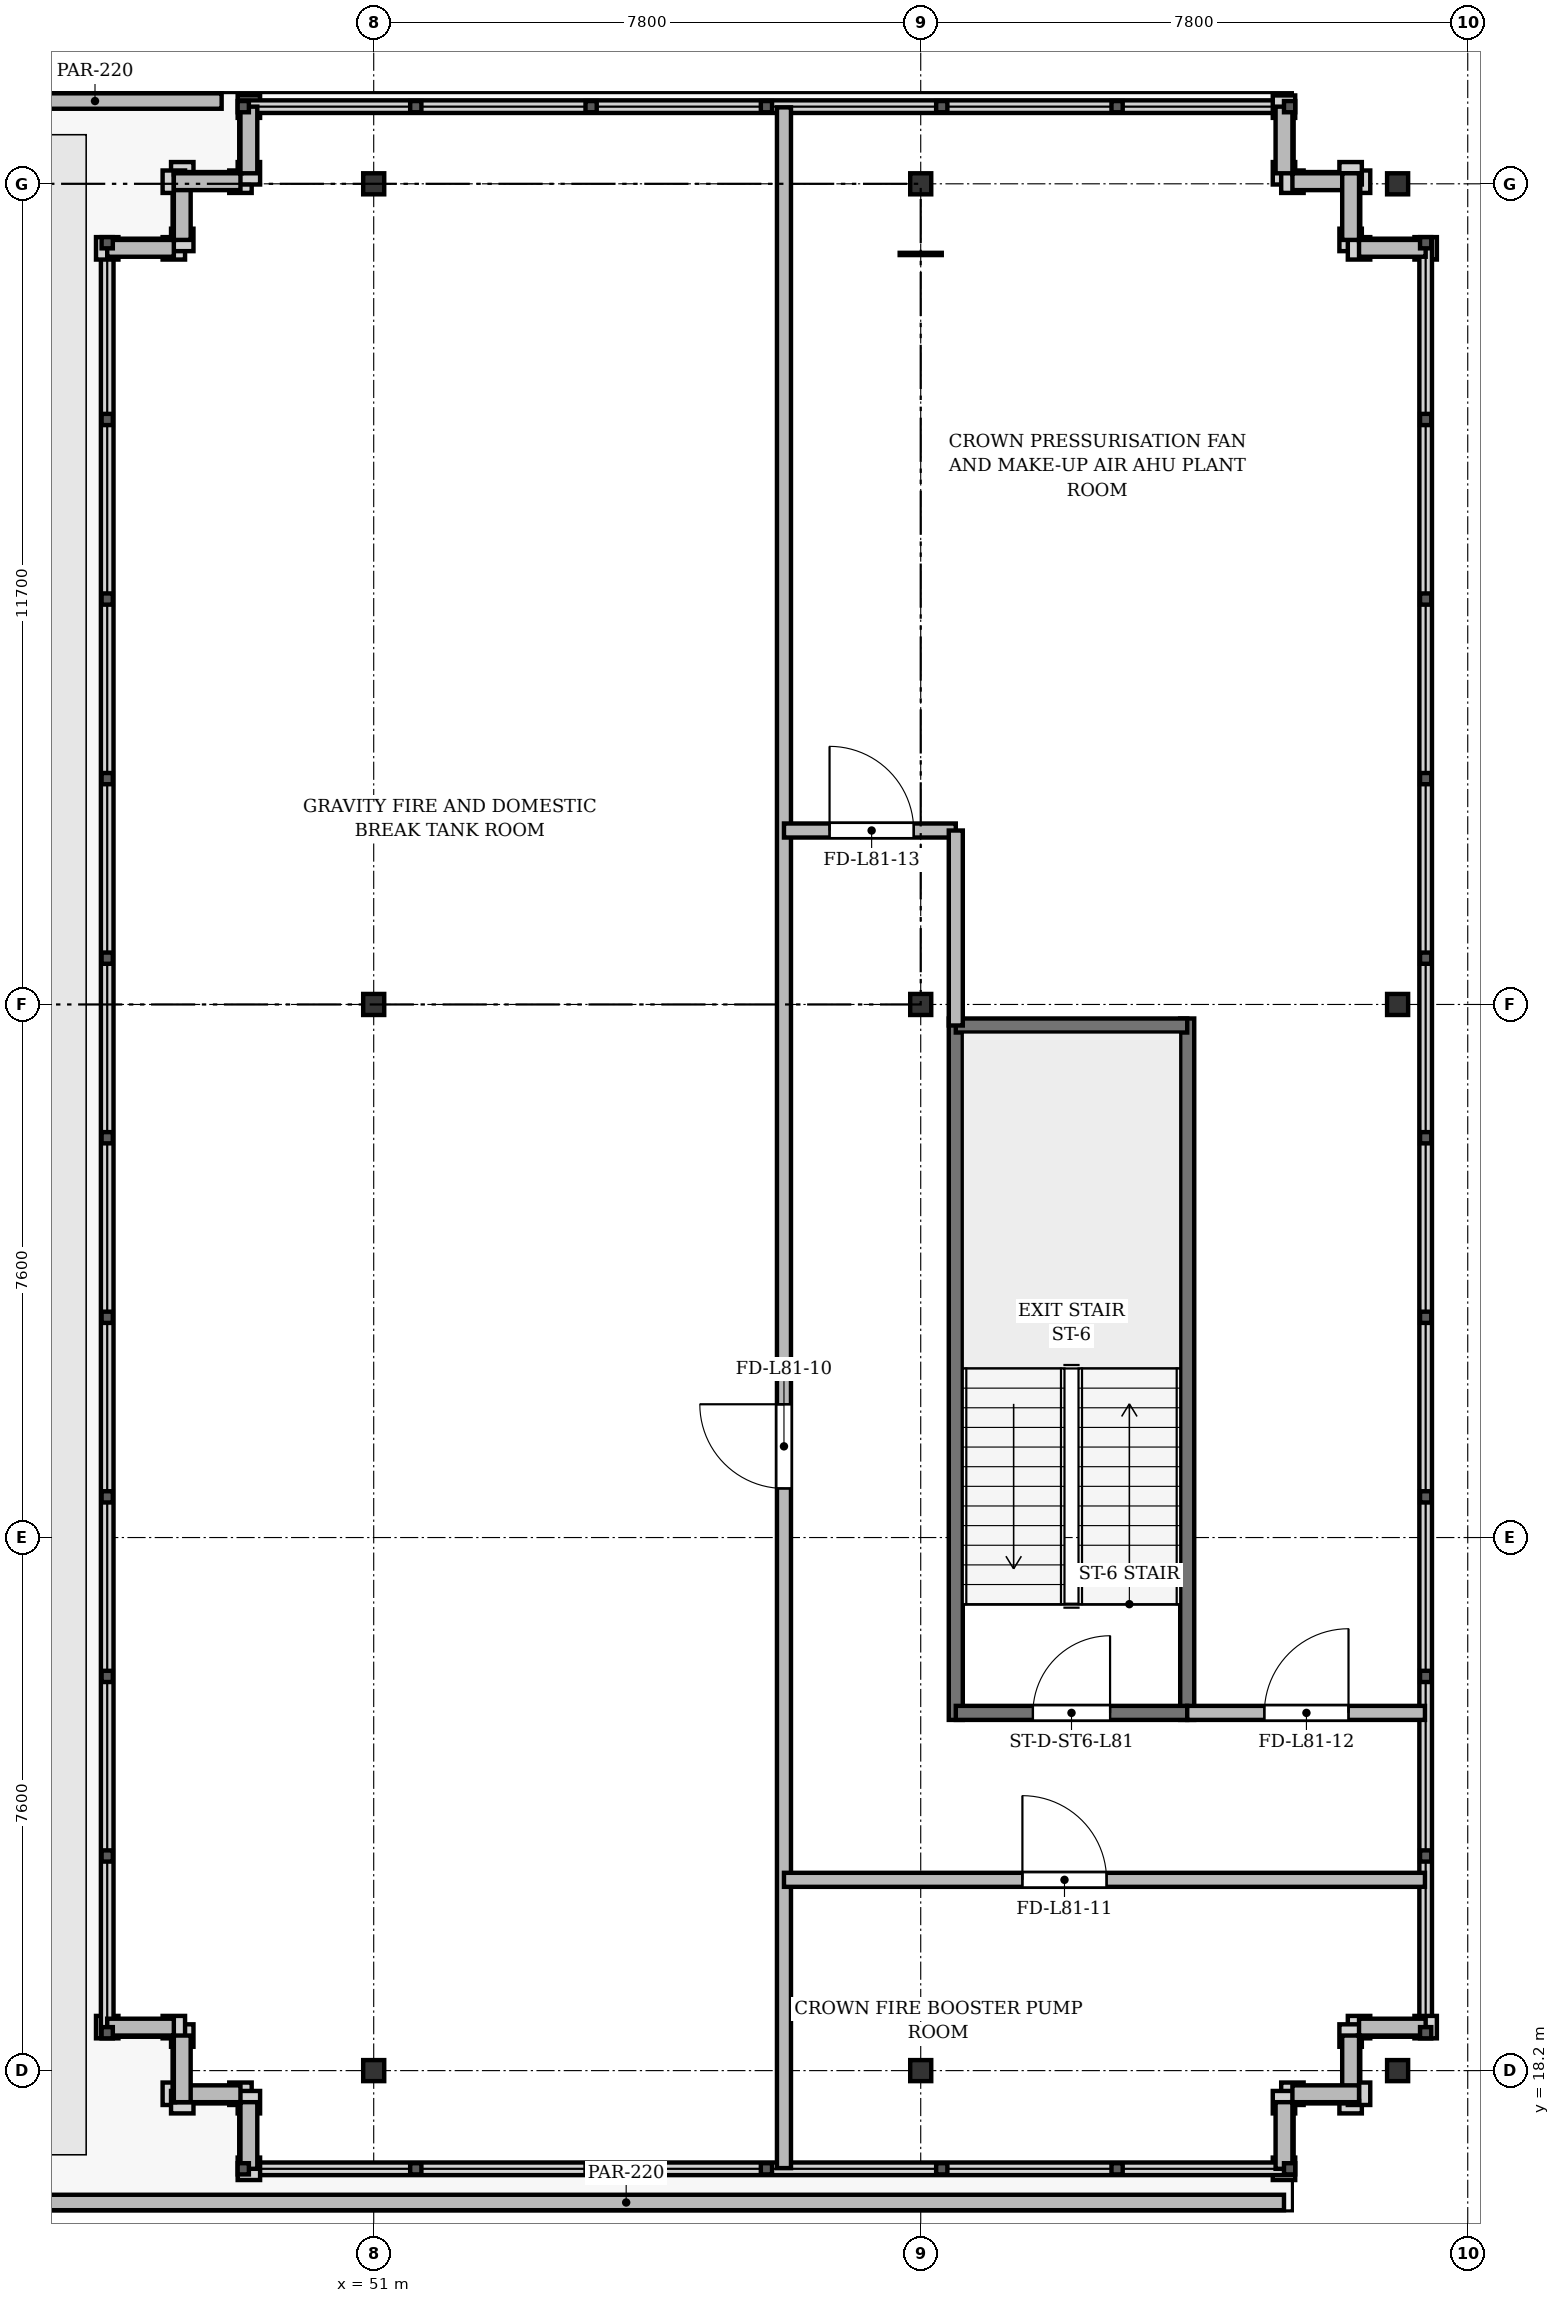
"""IFC4 building model, lengths in metres.
Left out: names, types, materials, properties, quantities, classifications, styles, units other than length and angle.
Written with IfcOpenShell. Run it as: python <this file> out.ifc"""

import sys

from ifc_helpers import new_model, si_unit, direction, frame, frame_2d, origin, origin_2d, place, context, subcontext, project, spatial, rectangle, i_section, extrude, source, transform, mapped, element, fill, save


model = new_model("IFC4")
c1 = context("Model", 3, precision=1e-05, world=origin(), true_north=direction((0.0, 1.0)))
c2 = subcontext(c1, "Body", "Model", "MODEL_VIEW")
j1 = project(units=[si_unit("LENGTHUNIT", "METRE"), si_unit("PLANEANGLEUNIT", "RADIAN")], contexts=[c1])
p1 = place(None, origin())
s1 = spatial("IfcSite", under=j1, at=p1, CompositionType="ELEMENT")
p2 = place(p1, origin())
s2 = spatial("IfcBuilding", under=s1, at=p2, CompositionType="ELEMENT")
p3 = place(p2, frame((0.0, 0.0, 312.3)))
s3 = spatial("IfcBuildingStorey", under=s2, at=p3, CompositionType="ELEMENT", Elevation=312.3)
m1 = source(origin(), c2, "Body", "SweptSolid", [
    extrude(i_section(OverallWidth=0.3, OverallDepth=0.3, WebThickness=0.015, FlangeThickness=0.024, at=origin_2d()), origin(), (0.0, 0.0, 1.0), 4.4),
])
for number, where, z_axis, x_axis in (
    (1, (51.0, 18.2, 0.0), (0.0, 0.0, 1.0), (1.0, 0.0, 0.0)),
    (2, (51.0, 33.4, 0.0), (0.0, 0.0, 1.0), (1.0, 0.0, 0.0)),
    (3, (51.0, 45.1, 0.0), (0.0, 0.0, 1.0), (1.0, 0.0, 0.0)),
    (4, (58.8, 18.2, 0.0), (0.0, 0.0, 1.0), (1.0, 0.0, 0.0)),
    (5, (58.8, 33.4, 0.0), (0.0, 0.0, 1.0), (1.0, 0.0, 0.0)),
    (6, (58.8, 45.1, 0.0), (0.0, 0.0, 1.0), (1.0, 0.0, 0.0)),
    (7, (65.6, 18.2, 0.0), (0.0, 0.0, 1.0), (1.0, 0.0, 0.0)),
    (8, (65.6, 33.4, 0.0), (0.0, 0.0, 1.0), (1.0, 0.0, 0.0)),
    (9, (65.6, 45.1, 0.0), (0.0, 0.0, 1.0), (1.0, 0.0, 0.0)),
):
    element("IfcColumn", number, at=place(p3, frame(where, z_axis=z_axis, x_axis=x_axis)), inside=s3, PredefinedType="COLUMN", context=c2, shape_type="MappedRepresentation", body=[
        mapped(m1, transform((0.0, 0.0, 0.0), x_axis=(1.0, 0.0, 0.0), y_axis=(0.0, 1.0, 0.0), z_axis=(0.0, 0.0, 1.0), scale=1.0)),
    ])
p4 = place(p3, frame((49.1, 17.87, 0.0), z_axis=(0.0, 0.0, 1.0), x_axis=(-1.0, 0.0, 0.0)))
e10 = element("IfcWall", 10, at=p4, inside=s3, PredefinedType="SOLIDWALL", context=c2, shape_type="SweptSolid", body=[
    extrude(rectangle(XDim=0.95, YDim=0.24, at=frame_2d((0.475, 0.0))), origin(), (0.0, 0.0, 1.0), 4.11),
])
for number, where, z_axis, x_axis in (
    (11, (48.27, 17.75, 0.0), (0.0, 0.0, 1.0), (0.0, 1.0, 0.0)),
    (12, (48.15, 18.82, 0.0), (0.0, 0.0, 1.0), (-1.0, 0.0, 0.0)),
    (13, (47.2, 44.18, 0.0), (0.0, 0.0, 1.0), (1.0, 0.0, 0.0)),
    (14, (48.27, 44.3, 0.0), (0.0, 0.0, 1.0), (0.0, 1.0, 0.0)),
):
    element("IfcWall", number, at=place(p3, frame(where, z_axis=z_axis, x_axis=x_axis)), inside=s3, PredefinedType="SOLIDWALL", context=c2, shape_type="SweptSolid", body=[
        extrude(rectangle(XDim=0.95, YDim=0.24, at=frame_2d((0.475, 0.0))), origin(), (0.0, 0.0, 1.0), 4.11),
    ])
p5 = place(p3, frame((48.15, 45.13, 0.0), z_axis=(0.0, 0.0, 1.0), x_axis=(1.0, 0.0, 0.0)))
e15 = element("IfcWall", 15, at=p5, inside=s3, PredefinedType="SOLIDWALL", context=c2, shape_type="SweptSolid", body=[
    extrude(rectangle(XDim=0.95, YDim=0.24, at=frame_2d((0.475, 0.0))), origin(), (0.0, 0.0, 1.0), 4.11),
])
for number, where, z_axis, x_axis in (
    (16, (49.22, 45.25, 0.0), (0.0, 0.0, 1.0), (0.0, 1.0, 0.0)),
    (17, (63.98, 46.2, 0.0), (0.0, 0.0, 1.0), (0.0, -1.0, 0.0)),
):
    element("IfcWall", number, at=place(p3, frame(where, z_axis=z_axis, x_axis=x_axis)), inside=s3, PredefinedType="SOLIDWALL", context=c2, shape_type="SweptSolid", body=[
        extrude(rectangle(XDim=0.95, YDim=0.24, at=frame_2d((0.475, 0.0))), origin(), (0.0, 0.0, 1.0), 4.11),
    ])
for number, where, z_axis, x_axis in (
    (18, (64.1, 45.13, 0.0), (0.0, 0.0, 1.0), (1.0, 0.0, 0.0)),
    (19, (64.93, 45.25, 0.0), (0.0, 0.0, 1.0), (0.0, -1.0, 0.0)),
    (20, (65.05, 44.18, 0.0), (0.0, 0.0, 1.0), (1.0, 0.0, 0.0)),
    (21, (66.0, 18.82, 0.0), (0.0, 0.0, 1.0), (-1.0, 0.0, 0.0)),
    (22, (64.93, 18.7, 0.0), (0.0, 0.0, 1.0), (0.0, -1.0, 0.0)),
):
    element("IfcWall", number, at=place(p3, frame(where, z_axis=z_axis, x_axis=x_axis)), inside=s3, PredefinedType="SOLIDWALL", context=c2, shape_type="SweptSolid", body=[
        extrude(rectangle(XDim=0.95, YDim=0.24, at=frame_2d((0.475, 0.0))), origin(), (0.0, 0.0, 1.0), 3.61),
    ])
for number, where, z_axis, x_axis in (
    (23, (65.05, 17.87, 0.0), (0.0, 0.0, 1.0), (-1.0, 0.0, 0.0)),
    (24, (63.98, 17.75, 0.0), (0.0, 0.0, 1.0), (0.0, -1.0, 0.0)),
    (25, (49.22, 16.8, 0.0), (0.0, 0.0, 1.0), (0.0, 1.0, 0.0)),
):
    element("IfcWall", number, at=place(p3, frame(where, z_axis=z_axis, x_axis=x_axis)), inside=s3, PredefinedType="SOLIDWALL", context=c2, shape_type="SweptSolid", body=[
        extrude(rectangle(XDim=0.95, YDim=0.24, at=frame_2d((0.475, 0.0))), origin(), (0.0, 0.0, 1.0), 4.11),
    ])
p6 = place(p3, frame((45.22, 46.28, 0.0), z_axis=(0.0, 0.0, 1.0), x_axis=(1.0, 0.0, 0.0)))
e26 = element("IfcWall", 26, at=p6, inside=s3, PredefinedType="PARAPET", context=c2, shape_type="SweptSolid", body=[
    extrude(rectangle(XDim=3.612, YDim=0.22, at=frame_2d((1.806, 0.0))), origin(), (0.0, 0.0, 1.0), 1.08),
])
p7 = place(p3, frame((63.98, 16.32, 0.0), z_axis=(0.0, 0.0, 1.0), x_axis=(-1.0, 0.0, 0.0)))
e27 = element("IfcWall", 27, at=p7, inside=s3, PredefinedType="PARAPET", context=c2, shape_type="SweptSolid", body=[
    extrude(rectangle(XDim=18.76, YDim=0.22, at=frame_2d((9.38, 0.0))), origin(), (0.0, 0.0, 1.0), 1.08),
])
for number, where, z_axis, x_axis in (
    (28, (59.3, 23.2, 0.0), (0.0, 0.0, 1.0), (0.0, 1.0, 0.0)),
    (29, (62.6, 23.2, 0.0), (0.0, 0.0, 1.0), (0.0, 1.0, 0.0)),
):
    element("IfcWall", number, at=place(p3, frame(where, z_axis=z_axis, x_axis=x_axis)), inside=s3, PredefinedType="SHEAR", context=c2, shape_type="SweptSolid", body=[
        extrude(rectangle(XDim=10.0, YDim=0.2, at=frame_2d((5.0, 0.0))), origin(), (0.0, 0.0, 1.0), 4.11),
    ])
p8 = place(p3, frame((59.3, 33.1, 0.0), z_axis=(0.0, 0.0, 1.0), x_axis=(1.0, 0.0, 0.0)))
e30 = element("IfcWall", 30, at=p8, inside=s3, PredefinedType="SHEAR", context=c2, shape_type="SweptSolid", body=[
    extrude(rectangle(XDim=3.3, YDim=0.2, at=frame_2d((1.65, 0.0))), origin(), (0.0, 0.0, 1.0), 4.11),
])
p9 = place(p3, frame((59.3, 23.3, 0.0), z_axis=(0.0, 0.0, 1.0), x_axis=(1.0, 0.0, 0.0)))
e31 = element("IfcWall", 31, at=p9, inside=s3, PredefinedType="SHEAR", context=c2, shape_type="SweptSolid", body=[
    extrude(rectangle(XDim=3.3, YDim=0.2, at=frame_2d((1.65, 0.0))), origin(), (0.0, 0.0, 1.0), 4.11),
])
p10 = place(p9, frame((1.1, 0.0, 0.0)))
e32 = element("IfcOpeningElement", 32, at=p10, cuts=e31, PredefinedType="OPENING", context=c2, shape_type="SweptSolid", body=[
    extrude(rectangle(XDim=1.1, YDim=2.15, at=frame_2d((0.55, 1.075))), frame((0.0, 0.11, 0.0), z_axis=(0.0, -1.0, 0.0), x_axis=(1.0, 0.0, 0.0)), (0.0, 0.0, 1.0), 0.22),
])
p11 = place(p3, frame((56.85, 16.81, 0.0), z_axis=(0.0, 0.0, 1.0), x_axis=(0.0, 1.0, 0.0)))
e33 = element("IfcWall", 33, at=p11, inside=s3, PredefinedType="PARTITIONING", context=c2, shape_type="SweptSolid", body=[
    extrude(rectangle(XDim=29.38, YDim=0.2, at=frame_2d((14.69, 0.0))), origin(), (0.0, 0.0, 1.0), 3.61),
])
p12 = place(p11, frame((9.69, 0.0, 0.0)))
e34 = element("IfcOpeningElement", 34, at=p12, cuts=e33, PredefinedType="OPENING", context=c2, shape_type="SweptSolid", body=[
    extrude(rectangle(XDim=1.2, YDim=2.15, at=frame_2d((0.6, 1.075))), frame((0.0, 0.11, 0.0), z_axis=(0.0, -1.0, 0.0), x_axis=(1.0, 0.0, 0.0)), (0.0, 0.0, 1.0), 0.22),
])
p13 = place(p3, frame((56.85, 20.92, 0.0), z_axis=(0.0, 0.0, 1.0), x_axis=(1.0, 0.0, 0.0)))
e35 = element("IfcWall", 35, at=p13, inside=s3, PredefinedType="PARTITIONING", context=c2, shape_type="SweptSolid", body=[
    extrude(rectangle(XDim=9.14, YDim=0.2, at=frame_2d((4.57, 0.0))), origin(), (0.0, 0.0, 1.0), 3.61),
])
p14 = place(p13, frame((3.4, 0.0, 0.0)))
e36 = element("IfcOpeningElement", 36, at=p14, cuts=e35, PredefinedType="OPENING", context=c2, shape_type="SweptSolid", body=[
    extrude(rectangle(XDim=1.2, YDim=2.15, at=frame_2d((0.6, 1.075))), frame((0.0, 0.11, 0.0), z_axis=(0.0, -1.0, 0.0), x_axis=(1.0, 0.0, 0.0)), (0.0, 0.0, 1.0), 0.22),
])
p15 = place(p3, frame((62.6, 23.3, 0.0), z_axis=(0.0, 0.0, 1.0), x_axis=(1.0, 0.0, 0.0)))
e37 = element("IfcWall", 37, at=p15, inside=s3, PredefinedType="PARTITIONING", context=c2, shape_type="SweptSolid", body=[
    extrude(rectangle(XDim=3.39, YDim=0.2, at=frame_2d((1.695, 0.0))), origin(), (0.0, 0.0, 1.0), 3.61),
])
p16 = place(p15, frame((1.1, 0.0, 0.0)))
e38 = element("IfcOpeningElement", 38, at=p16, cuts=e37, PredefinedType="OPENING", context=c2, shape_type="SweptSolid", body=[
    extrude(rectangle(XDim=1.2, YDim=2.15, at=frame_2d((0.6, 1.075))), frame((0.0, 0.11, 0.0), z_axis=(0.0, -1.0, 0.0), x_axis=(1.0, 0.0, 0.0)), (0.0, 0.0, 1.0), 0.22),
])
p17 = place(p3, frame((56.85, 35.88, 0.0), z_axis=(0.0, 0.0, 1.0), x_axis=(1.0, 0.0, 0.0)))
e39 = element("IfcWall", 39, at=p17, inside=s3, PredefinedType="PARTITIONING", context=c2, shape_type="SweptSolid", body=[
    extrude(rectangle(XDim=2.45, YDim=0.2, at=frame_2d((1.225, 0.0))), origin(), (0.0, 0.0, 1.0), 3.61),
])
p18 = place(p17, frame((0.65, 0.0, 0.0)))
e40 = element("IfcOpeningElement", 40, at=p18, cuts=e39, PredefinedType="OPENING", context=c2, shape_type="SweptSolid", body=[
    extrude(rectangle(XDim=1.2, YDim=2.15, at=frame_2d((0.6, 1.075))), frame((0.0, 0.11, 0.0), z_axis=(0.0, -1.0, 0.0), x_axis=(1.0, 0.0, 0.0)), (0.0, 0.0, 1.0), 0.22),
])
p19 = place(p3, frame((59.3, 33.1, 0.0), z_axis=(0.0, 0.0, 1.0), x_axis=(0.0, 1.0, 0.0)))
e41 = element("IfcWall", 41, at=p19, inside=s3, PredefinedType="PARTITIONING", context=c2, shape_type="SweptSolid", body=[
    extrude(rectangle(XDim=2.78, YDim=0.2, at=frame_2d((1.39, 0.0))), origin(), (0.0, 0.0, 1.0), 3.61),
])
m2 = source(origin(), c2, "Body", "SweptSolid", [
    extrude(rectangle(XDim=1.1, YDim=2.15, at=frame_2d((0.55, 1.075))), frame((0.0, 0.025, 0.0), z_axis=(0.0, -1.0, 0.0), x_axis=(1.0, 0.0, 0.0)), (0.0, 0.0, 1.0), 0.05),
])
p20 = place(p10, origin())
e42 = element("IfcDoor", 42, at=p20, inside=s3, OperationType="SINGLE_SWING_RIGHT", PredefinedType="DOOR", context=c2, shape_type="MappedRepresentation", body=[
    mapped(m2, transform((0.0, 0.0, 0.0), x_axis=(1.0, 0.0, 0.0), y_axis=(0.0, 1.0, 0.0), z_axis=(0.0, 0.0, 1.0), scale=1.0)),
])
fill(e32, e42)
m3 = source(origin(), c2, "Body", "SweptSolid", [
    extrude(rectangle(XDim=1.2, YDim=2.15, at=frame_2d((0.6, 1.075))), frame((0.0, 0.025, 0.0), z_axis=(0.0, -1.0, 0.0), x_axis=(1.0, 0.0, 0.0)), (0.0, 0.0, 1.0), 0.05),
])
p21 = place(p12, origin())
e43 = element("IfcDoor", 43, at=p21, inside=s3, OperationType="SINGLE_SWING_RIGHT", PredefinedType="DOOR", context=c2, shape_type="MappedRepresentation", body=[
    mapped(m3, transform((0.0, 0.0, 0.0), x_axis=(1.0, 0.0, 0.0), y_axis=(0.0, 1.0, 0.0), z_axis=(0.0, 0.0, 1.0), scale=1.0)),
])
fill(e34, e43)
p22 = place(p14, origin())
e44 = element("IfcDoor", 44, at=p22, inside=s3, OperationType="SINGLE_SWING_LEFT", PredefinedType="DOOR", context=c2, shape_type="MappedRepresentation", body=[
    mapped(m3, transform((0.0, 0.0, 0.0), x_axis=(1.0, 0.0, 0.0), y_axis=(0.0, 1.0, 0.0), z_axis=(0.0, 0.0, 1.0), scale=1.0)),
])
fill(e36, e44)
p23 = place(p16, origin())
e45 = element("IfcDoor", 45, at=p23, inside=s3, OperationType="SINGLE_SWING_RIGHT", PredefinedType="DOOR", context=c2, shape_type="MappedRepresentation", body=[
    mapped(m3, transform((0.0, 0.0, 0.0), x_axis=(1.0, 0.0, 0.0), y_axis=(0.0, 1.0, 0.0), z_axis=(0.0, 0.0, 1.0), scale=1.0)),
])
fill(e38, e45)
p24 = place(p18, origin())
e46 = element("IfcDoor", 46, at=p24, inside=s3, OperationType="SINGLE_SWING_LEFT", PredefinedType="DOOR", context=c2, shape_type="MappedRepresentation", body=[
    mapped(m3, transform((0.0, 0.0, 0.0), x_axis=(1.0, 0.0, 0.0), y_axis=(0.0, 1.0, 0.0), z_axis=(0.0, 0.0, 1.0), scale=1.0)),
])
fill(e40, e46)
save(model, sys.argv[1])
